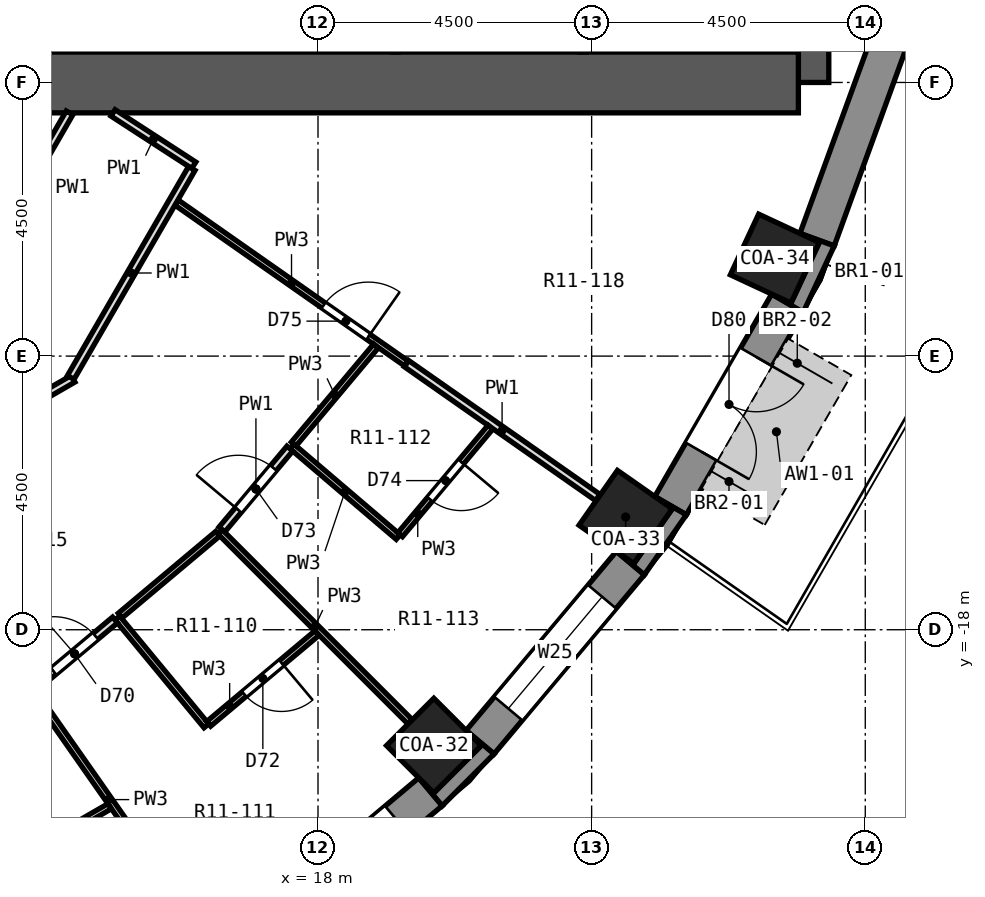
"""IFC4 building model, lengths in metres.
Left out: names, types, materials, properties, quantities, classifications, styles, units other than length and angle.
Written with IfcOpenShell. Run it as: python <this file> out.ifc"""

import sys

from ifc_helpers import new_model, si_unit, direction, frame, frame_2d, origin, origin_2d, place, context, subcontext, project, spatial, polyline, rectangle, outline, extrude, element, fill, save


model = new_model("IFC4")
c1 = context("Model", 3, precision=1e-05, world=origin(), true_north=direction((0.0, 1.0)))
c2 = subcontext(c1, "Body", "Model", "MODEL_VIEW")
j1 = project(units=[si_unit("LENGTHUNIT", "METRE"), si_unit("PLANEANGLEUNIT", "RADIAN")], contexts=[c1])
p1 = place(None, origin())
s1 = spatial("IfcSite", under=j1, at=p1, CompositionType="ELEMENT")
p2 = place(p1, origin())
s2 = spatial("IfcBuilding", under=s1, at=p2, CompositionType="ELEMENT")
p3 = place(p2, frame((0.0, 0.0, 46.1)))
s3 = spatial("IfcBuildingStorey", under=s2, at=p3, CompositionType="ELEMENT", Elevation=46.1)
for number, where, z_axis, x_axis in (
    (1, (19.905, -19.905, 0.0), (0.0, 0.0, 1.0), (0.707, -0.707, 0.0)),
    (2, (23.059, -16.146, 0.0), (0.0, 0.0, 1.0), (0.819, -0.574, 0.0)),
    (3, (25.512, -11.897, 0.0), (0.0, 0.0, 1.0), (0.906, -0.423, 0.0)),
):
    element("IfcColumn", number, at=place(p3, frame(where, z_axis=z_axis, x_axis=x_axis)), inside=s3, PredefinedType="COLUMN", context=c2, shape_type="SweptSolid", body=[
        extrude(rectangle(XDim=1.1, YDim=1.1, at=origin_2d()), origin(), (0.0, 0.0, 1.0), 3.3),
    ])
p4 = place(p3, frame((13.5, -9.0, 0.0), z_axis=(0.0, 0.0, 1.0), x_axis=(0.0, 1.0, 0.0)))
e4 = element("IfcWall", 4, at=p4, inside=s3, PredefinedType="SHEAR", context=c2, shape_type="SweptSolid", body=[
    extrude(rectangle(XDim=18.0, YDim=1.0, at=frame_2d((9.0, 0.0))), origin(), (0.0, 0.0, 1.0), 3.3),
])
p5 = place(p4, frame((15.4, 0.0, 0.0)))
e5 = element("IfcOpeningElement", 5, at=p5, cuts=e4, PredefinedType="OPENING", context=c2, shape_type="SweptSolid", body=[
    extrude(rectangle(XDim=1.2, YDim=2.1, at=frame_2d((0.6, 1.05))), frame((0.0, 0.512, 0.0), z_axis=(0.0, -1.0, 0.0), x_axis=(1.0, 0.0, 0.0)), (0.0, 0.0, 1.0), 1.024),
])
p6 = place(p4, frame((1.4, 0.0, 0.0)))
e6 = element("IfcOpeningElement", 6, at=p6, cuts=e4, PredefinedType="OPENING", context=c2, shape_type="SweptSolid", body=[
    extrude(rectangle(XDim=1.2, YDim=2.1, at=frame_2d((0.6, 1.05))), frame((0.0, 0.512, 0.0), z_axis=(0.0, -1.0, 0.0), x_axis=(1.0, 0.0, 0.0)), (0.0, 0.0, 1.0), 1.024),
])
p7 = place(p4, frame((7.5, 0.0, 0.0)))
e7 = element("IfcOpeningElement", 7, at=p7, cuts=e4, PredefinedType="OPENING", context=c2, shape_type="SweptSolid", body=[
    extrude(rectangle(XDim=3.0, YDim=2.4, at=frame_2d((1.5, 1.2))), frame((0.0, 0.512, 0.0), z_axis=(0.0, -1.0, 0.0), x_axis=(1.0, 0.0, 0.0)), (0.0, 0.0, 1.0), 1.024),
])
p8 = place(p3, frame((25.9, -9.0, 0.0), z_axis=(0.0, 0.0, 1.0), x_axis=(0.0, 1.0, 0.0)))
e8 = element("IfcWall", 8, at=p8, inside=s3, PredefinedType="SHEAR", context=c2, shape_type="SweptSolid", body=[
    extrude(rectangle(XDim=18.0, YDim=1.0, at=frame_2d((9.0, 0.0))), origin(), (0.0, 0.0, 1.0), 3.3),
])
p9 = place(p3, frame((13.5, -9.0, 0.0), z_axis=(0.0, 0.0, 1.0), x_axis=(1.0, 0.0, 0.0)))
e9 = element("IfcWall", 9, at=p9, inside=s3, PredefinedType="SHEAR", context=c2, shape_type="SweptSolid", body=[
    extrude(rectangle(XDim=12.4, YDim=1.0, at=frame_2d((6.2, 0.0))), origin(), (0.0, 0.0, 1.0), 3.3),
])
p10 = place(p3, frame((16.904, -23.137, 0.0), z_axis=(0.0, 0.0, 1.0), x_axis=(0.766026164483, 0.642809392687, 0.0)))
e10 = element("IfcWall", 10, at=p10, inside=s3, PredefinedType="SOLIDWALL", context=c2, shape_type="SweptSolid", body=[
    extrude(rectangle(XDim=3.846, YDim=0.6, at=frame_2d((1.923, 0.0))), origin(), (0.0, 0.0, 1.0), 2.75),
])
p11 = place(p10, frame((0.723, 0.0, 0.9)))
e11 = element("IfcOpeningElement", 11, at=p11, cuts=e10, PredefinedType="OPENING", context=c2, shape_type="SweptSolid", body=[
    extrude(rectangle(XDim=2.4, YDim=1.8, at=frame_2d((1.2, 0.9))), frame((0.0, 0.312, 0.0), z_axis=(0.0, -1.0, 0.0), x_axis=(1.0, 0.0, 0.0)), (0.0, 0.0, 1.0), 0.624),
])
p12 = place(p3, frame((20.665, -19.85, 0.0), z_axis=(0.0, 0.0, 1.0), x_axis=(0.642809392687, 0.766026164483, 0.0)))
e12 = element("IfcWall", 12, at=p12, inside=s3, PredefinedType="SOLIDWALL", context=c2, shape_type="SweptSolid", body=[
    extrude(rectangle(XDim=3.846, YDim=0.6, at=frame_2d((1.923, 0.0))), origin(), (0.0, 0.0, 1.0), 2.75),
])
p13 = place(p12, frame((0.723, 0.0, 0.9)))
e13 = element("IfcOpeningElement", 13, at=p13, cuts=e12, PredefinedType="OPENING", context=c2, shape_type="SweptSolid", body=[
    extrude(rectangle(XDim=2.4, YDim=1.8, at=frame_2d((1.2, 0.9))), frame((0.0, 0.312, 0.0), z_axis=(0.0, -1.0, 0.0), x_axis=(1.0, 0.0, 0.0)), (0.0, 0.0, 1.0), 0.624),
])
p14 = place(p3, frame((23.798, -15.96, 0.0), z_axis=(0.0, 0.0, 1.0), x_axis=(0.499989888488, 0.86603124159, 0.0)))
e14 = element("IfcWall", 14, at=p14, inside=s3, PredefinedType="SOLIDWALL", context=c2, shape_type="SweptSolid", body=[
    extrude(rectangle(XDim=3.846, YDim=0.6, at=frame_2d((1.923, 0.0))), origin(), (0.0, 0.0, 1.0), 2.75),
])
p15 = place(p14, frame((1.023, 0.0, 0.0)))
e15 = element("IfcOpeningElement", 15, at=p15, cuts=e14, PredefinedType="OPENING", context=c2, shape_type="SweptSolid", body=[
    extrude(rectangle(XDim=1.8, YDim=2.4, at=frame_2d((0.9, 1.2))), frame((0.0, 0.312, 0.0), z_axis=(0.0, -1.0, 0.0), x_axis=(1.0, 0.0, 0.0)), (0.0, 0.0, 1.0), 0.624),
])
p16 = place(p3, frame((26.208, -11.585, 0.0), z_axis=(0.0, 0.0, 1.0), x_axis=(0.342028474173, 0.939689588564, 0.0)))
e16 = element("IfcWall", 16, at=p16, inside=s3, PredefinedType="SOLIDWALL", context=c2, shape_type="SweptSolid", body=[
    extrude(rectangle(XDim=3.846, YDim=0.6, at=frame_2d((1.923, 0.0))), origin(), (0.0, 0.0, 1.0), 2.75),
])
p17 = place(p3, origin())
e17 = element("IfcWall", 17, at=p17, inside=s3, PredefinedType="SOLIDWALL", context=c2, shape_type="SweptSolid", body=[
    extrude(outline(polyline([(20.895, -20.043), (20.435, -19.657), (20.683, -19.905), (19.905, -20.683), (19.657, -20.435), (20.043, -20.895), (20.895, -20.043)])), origin(), (0.0, 0.0, 1.0), 2.75),
])
p18 = place(p3, origin())
e18 = element("IfcWall", 18, at=p18, inside=s3, PredefinedType="SOLIDWALL", context=c2, shape_type="SweptSolid", body=[
    extrude(outline(polyline([(23.367, -17.097), (24.058, -16.11), (23.538, -15.81), (23.825, -16.011), (23.194, -16.912), (22.907, -16.711), (23.367, -17.097)])), origin(), (0.0, 0.0, 1.0), 2.75),
])
p19 = place(p3, origin())
e19 = element("IfcWall", 19, at=p19, inside=s3, PredefinedType="SOLIDWALL", context=c2, shape_type="SweptSolid", body=[
    extrude(outline(polyline([(26.49, -11.688), (25.926, -11.483), (26.243, -11.631), (25.779, -12.628), (25.461, -12.479), (25.981, -12.78), (26.49, -11.688)])), origin(), (0.0, 0.0, 1.0), 2.75),
])
p20 = place(p3, frame((13.294, -18.986, 0.0), z_axis=(0.0, 0.0, 1.0), x_axis=(0.573391786342, -0.819281306607, 0.0)))
e20 = element("IfcWall", 20, at=p20, inside=s3, PredefinedType="PARTITIONING", context=c2, shape_type="SweptSolid", body=[
    extrude(rectangle(XDim=4.412, YDim=0.1, at=frame_2d((2.206, 0.0))), origin(), (0.0, 0.0, 1.0), 2.75),
])
p21 = place(p3, frame((14.7, -17.807, 0.0), z_axis=(0.0, 0.0, 1.0), x_axis=(0.636700344293, -0.771111322428, 0.0)))
e21 = element("IfcWall", 21, at=p21, inside=s3, PredefinedType="PARTITIONING", context=c2, shape_type="SweptSolid", body=[
    extrude(rectangle(XDim=2.3, YDim=0.1, at=frame_2d((1.15, 0.0))), origin(), (0.0, 0.0, 1.0), 2.75),
])
p22 = place(p3, frame((16.389, -16.389, 0.0), z_axis=(0.0, 0.0, 1.0), x_axis=(0.707106781187, -0.707106781187, 0.0)))
e22 = element("IfcWall", 22, at=p22, inside=s3, PredefinedType="PARTITIONING", context=c2, shape_type="SweptSolid", body=[
    extrude(rectangle(XDim=4.413, YDim=0.1, at=frame_2d((2.206, 0.0))), origin(), (0.0, 0.0, 1.0), 2.75),
])
p23 = place(p3, frame((17.569, -14.983, 0.0), z_axis=(0.0, 0.0, 1.0), x_axis=(0.760722977127, -0.649076691979, 0.0)))
e23 = element("IfcWall", 23, at=p23, inside=s3, PredefinedType="PARTITIONING", context=c2, shape_type="SweptSolid", body=[
    extrude(rectangle(XDim=2.301, YDim=0.1, at=frame_2d((1.15, 0.0))), origin(), (0.0, 0.0, 1.0), 2.75),
])
p24 = place(p3, frame((19.454, -13.623, 0.0), z_axis=(0.0, 0.0, 1.0), x_axis=(0.819318529686, -0.573338597091, 0.0)))
e24 = element("IfcWall", 24, at=p24, inside=s3, PredefinedType="PARTITIONING", context=c2, shape_type="SweptSolid", body=[
    extrude(rectangle(XDim=3.84, YDim=0.125, at=frame_2d((1.92, 0.0))), origin(), (0.0, 0.0, 1.0), 2.75),
])
p25 = place(p3, frame((15.675, -10.976, 0.0), z_axis=(0.0, 0.0, 1.0), x_axis=(0.819202093006, -0.573504952737, 0.0)))
e25 = element("IfcWall", 25, at=p25, inside=s3, PredefinedType="PARTITIONING", context=c2, shape_type="SweptSolid", body=[
    extrude(rectangle(XDim=4.615, YDim=0.1, at=frame_2d((2.307, 0.0))), origin(), (0.0, 0.0, 1.0), 2.75),
])
p26 = place(p25, frame((2.949, 0.0, 0.0)))
e26 = element("IfcOpeningElement", 26, at=p26, cuts=e25, PredefinedType="OPENING", context=c2, shape_type="SweptSolid", body=[
    extrude(rectangle(XDim=0.9, YDim=2.1, at=frame_2d((0.45, 1.05))), frame((0.0, 0.062, 0.0), z_axis=(0.0, -1.0, 0.0), x_axis=(1.0, 0.0, 0.0)), (0.0, 0.0, 1.0), 0.124),
])
p27 = place(p3, frame((14.629, -9.5, 0.0), z_axis=(0.0, 0.0, 1.0), x_axis=(0.838795721465, -0.544446267002, 0.0)))
e27 = element("IfcWall", 27, at=p27, inside=s3, PredefinedType="PARTITIONING", context=c2, shape_type="SweptSolid", body=[
    extrude(rectangle(XDim=1.583, YDim=0.125, at=frame_2d((0.792, 0.0))), origin(), (0.0, 0.0, 1.0), 2.75),
])
p28 = place(p3, frame((12.562, -22.065, 0.0), z_axis=(0.0, 0.0, 1.0), x_axis=(0.865919666768, 0.50018309718, 0.0)))
e28 = element("IfcWall", 28, at=p28, inside=s3, PredefinedType="PARTITIONING", context=c2, shape_type="SweptSolid", body=[
    extrude(rectangle(XDim=2.324, YDim=0.1, at=frame_2d((1.162, 0.0))), origin(), (0.0, 0.0, 1.0), 2.75),
])
p29 = place(p28, frame((0.762, 0.0, 0.0)))
e29 = element("IfcOpeningElement", 29, at=p29, cuts=e28, PredefinedType="OPENING", context=c2, shape_type="SweptSolid", body=[
    extrude(rectangle(XDim=0.8, YDim=2.1, at=frame_2d((0.4, 1.05))), frame((0.0, 0.062, 0.0), z_axis=(0.0, -1.0, 0.0), x_axis=(1.0, 0.0, 0.0)), (0.0, 0.0, 1.0), 0.124),
])
p30 = place(p3, frame((5.145, -18.969, 0.0), z_axis=(0.0, 0.0, 1.0), x_axis=(0.866035198373, 0.499983034892, 0.0)))
e30 = element("IfcWall", 30, at=p30, inside=s3, PredefinedType="PARTITIONING", context=c2, shape_type="SweptSolid", body=[
    extrude(rectangle(XDim=10.192, YDim=0.125, at=frame_2d((5.096, 0.0))), origin(), (0.0, 0.0, 1.0), 2.75),
])
p31 = place(p30, frame((7.577, 0.0, 0.0)))
e31 = element("IfcOpeningElement", 31, at=p31, cuts=e30, PredefinedType="OPENING", context=c2, shape_type="SweptSolid", body=[
    extrude(rectangle(XDim=1.0, YDim=2.1, at=frame_2d((0.5, 1.05))), frame((0.0, 0.074, 0.0), z_axis=(0.0, -1.0, 0.0), x_axis=(1.0, 0.0, 0.0)), (0.0, 0.0, 1.0), 0.149),
])
p32 = place(p3, frame((13.332, -18.953, 0.0), z_axis=(0.0, 0.0, 1.0), x_axis=(0.766881682313, 0.641788505143, 0.0)))
e32 = element("IfcWall", 32, at=p32, inside=s3, PredefinedType="PARTITIONING", context=c2, shape_type="SweptSolid", body=[
    extrude(rectangle(XDim=1.735, YDim=0.125, at=frame_2d((0.868, 0.0))), origin(), (0.0, 0.0, 1.0), 2.75),
])
p33 = place(p32, frame((0.417, 0.0, 0.0)))
e33 = element("IfcOpeningElement", 33, at=p33, cuts=e32, PredefinedType="OPENING", context=c2, shape_type="SweptSolid", body=[
    extrude(rectangle(XDim=0.9, YDim=2.1, at=frame_2d((0.45, 1.05))), frame((0.0, 0.074, 0.0), z_axis=(0.0, -1.0, 0.0), x_axis=(1.0, 0.0, 0.0)), (0.0, 0.0, 1.0), 0.149),
])
p34 = place(p3, frame((16.202, -19.548, 0.0), z_axis=(0.0, 0.0, 1.0), x_axis=(0.766254925891, 0.642536682648, 0.0)))
e34 = element("IfcWall", 34, at=p34, inside=s3, PredefinedType="PARTITIONING", context=c2, shape_type="SweptSolid", body=[
    extrude(rectangle(XDim=2.325, YDim=0.1, at=frame_2d((1.162, 0.0))), origin(), (0.0, 0.0, 1.0), 2.75),
])
p35 = place(p34, frame((0.762, 0.0, 0.0)))
e35 = element("IfcOpeningElement", 35, at=p35, cuts=e34, PredefinedType="OPENING", context=c2, shape_type="SweptSolid", body=[
    extrude(rectangle(XDim=0.8, YDim=2.1, at=frame_2d((0.4, 1.05))), frame((0.0, 0.062, 0.0), z_axis=(0.0, -1.0, 0.0), x_axis=(1.0, 0.0, 0.0)), (0.0, 0.0, 1.0), 0.124),
])
p36 = place(p3, frame((14.748, -17.767, 0.0), z_axis=(0.0, 0.0, 1.0), x_axis=(0.765854222204, 0.643014238048, 0.0)))
e36 = element("IfcWall", 36, at=p36, inside=s3, PredefinedType="PARTITIONING", context=c2, shape_type="SweptSolid", body=[
    extrude(rectangle(XDim=2.093, YDim=0.1, at=frame_2d((1.046, 0.0))), origin(), (0.0, 0.0, 1.0), 2.75),
])
p37 = place(p3, frame((19.351, -16.438, 0.0), z_axis=(0.0, 0.0, 1.0), x_axis=(0.642780417595, 0.766050477943, 0.0)))
e37 = element("IfcWall", 37, at=p37, inside=s3, PredefinedType="PARTITIONING", context=c2, shape_type="SweptSolid", body=[
    extrude(rectangle(XDim=2.309, YDim=0.1, at=frame_2d((1.155, 0.0))), origin(), (0.0, 0.0, 1.0), 2.75),
])
p38 = place(p37, frame((0.762, 0.0, 0.0)))
e38 = element("IfcOpeningElement", 38, at=p38, cuts=e37, PredefinedType="OPENING", context=c2, shape_type="SweptSolid", body=[
    extrude(rectangle(XDim=0.8, YDim=2.1, at=frame_2d((0.4, 1.05))), frame((0.0, 0.062, 0.0), z_axis=(0.0, -1.0, 0.0), x_axis=(1.0, 0.0, 0.0)), (0.0, 0.0, 1.0), 0.124),
])
p39 = place(p3, frame((17.601, -14.945, 0.0), z_axis=(0.0, 0.0, 1.0), x_axis=(0.642816551594, 0.766020157043, 0.0)))
e39 = element("IfcWall", 39, at=p39, inside=s3, PredefinedType="PARTITIONING", context=c2, shape_type="SweptSolid", body=[
    extrude(rectangle(XDim=2.104, YDim=0.1, at=frame_2d((1.052, 0.0))), origin(), (0.0, 0.0, 1.0), 2.75),
])
p40 = place(p3, frame((16.421, -16.351, 0.0), z_axis=(0.0, 0.0, 1.0), x_axis=(0.642878617967, 0.765968068891, 0.0)))
e40 = element("IfcWall", 40, at=p40, inside=s3, PredefinedType="PARTITIONING", context=c2, shape_type="SweptSolid", body=[
    extrude(rectangle(XDim=1.736, YDim=0.125, at=frame_2d((0.868, 0.0))), origin(), (0.0, 0.0, 1.0), 2.75),
])
p41 = place(p40, frame((0.418, 0.0, 0.0)))
e41 = element("IfcOpeningElement", 41, at=p41, cuts=e40, PredefinedType="OPENING", context=c2, shape_type="SweptSolid", body=[
    extrude(rectangle(XDim=0.9, YDim=2.1, at=frame_2d((0.45, 1.05))), frame((0.0, 0.074, 0.0), z_axis=(0.0, -1.0, 0.0), x_axis=(1.0, 0.0, 0.0)), (0.0, 0.0, 1.0), 0.149),
])
p42 = place(p3, frame((13.934, -13.851, 0.0), z_axis=(0.0, 0.0, 1.0), x_axis=(0.501169568558, 0.865349099238, 0.0)))
e42 = element("IfcWall", 42, at=p42, inside=s3, PredefinedType="PARTITIONING", context=c2, shape_type="SweptSolid", body=[
    extrude(rectangle(XDim=3.971, YDim=0.125, at=frame_2d((1.985, 0.0))), origin(), (0.0, 0.0, 1.0), 2.75),
])
p43 = place(p3, frame((13.045, -11.005, 0.0), z_axis=(0.0, 0.0, 1.0), x_axis=(0.500066958712, 0.865986741702, 0.0)))
e43 = element("IfcWall", 43, at=p43, inside=s3, PredefinedType="PARTITIONING", context=c2, shape_type="SweptSolid", body=[
    extrude(rectangle(XDim=1.738, YDim=0.125, at=frame_2d((0.869, 0.0))), origin(), (0.0, 0.0, 1.0), 2.75),
])
p44 = place(p3, frame((19.27, -8.5, 0.0), z_axis=(0.0, 0.0, 1.0), x_axis=(0.0, 1.0, 0.0)))
e44 = element("IfcWall", 44, at=p44, inside=s3, PredefinedType="PARTITIONING", context=c2, shape_type="SweptSolid", body=[
    extrude(rectangle(XDim=3.2, YDim=0.1, at=frame_2d((1.6, 0.0))), origin(), (0.0, 0.0, 1.0), 2.75),
])
p45 = place(p3, frame((22.36, -8.5, 0.0), z_axis=(0.0, 0.0, 1.0), x_axis=(0.0, 1.0, 0.0)))
e45 = element("IfcWall", 45, at=p45, inside=s3, PredefinedType="PARTITIONING", context=c2, shape_type="SweptSolid", body=[
    extrude(rectangle(XDim=3.2, YDim=0.1, at=frame_2d((1.6, 0.0))), origin(), (0.0, 0.0, 1.0), 2.75),
])
p46 = place(p45, frame((1.15, 0.0, 0.0)))
e46 = element("IfcOpeningElement", 46, at=p46, cuts=e45, PredefinedType="OPENING", context=c2, shape_type="SweptSolid", body=[
    extrude(rectangle(XDim=0.9, YDim=2.1, at=frame_2d((0.45, 1.05))), frame((0.0, 0.062, 0.0), z_axis=(0.0, -1.0, 0.0), x_axis=(1.0, 0.0, 0.0)), (0.0, 0.0, 1.0), 0.124),
])
p47 = place(p11, origin())
e47 = element("IfcWindow", 47, at=p47, inside=s3, PartitioningType="SINGLE_PANEL", PredefinedType="WINDOW", context=c2, shape_type="SweptSolid", body=[
    extrude(rectangle(XDim=2.4, YDim=1.8, at=frame_2d((1.2, 0.9))), frame((0.0, 0.18, 0.0), z_axis=(0.0, -1.0, 0.0), x_axis=(1.0, 0.0, 0.0)), (0.0, 0.0, 1.0), 0.06),
])
fill(e11, e47)
p48 = place(p13, origin())
e48 = element("IfcWindow", 48, at=p48, inside=s3, PartitioningType="SINGLE_PANEL", PredefinedType="WINDOW", context=c2, shape_type="SweptSolid", body=[
    extrude(rectangle(XDim=2.4, YDim=1.8, at=frame_2d((1.2, 0.9))), frame((0.0, 0.18, 0.0), z_axis=(0.0, -1.0, 0.0), x_axis=(1.0, 0.0, 0.0)), (0.0, 0.0, 1.0), 0.06),
])
fill(e13, e48)
p49 = place(p15, frame((1.8, 0.0, 0.0), z_axis=(0.0, 0.0, 1.0), x_axis=(-1.0, 0.0, 0.0)))
e49 = element("IfcDoor", 49, at=p49, inside=s3, OperationType="DOUBLE_DOOR_SINGLE_SWING", PredefinedType="DOOR", context=c2, shape_type="SweptSolid", body=[
    extrude(rectangle(XDim=1.8, YDim=2.4, at=frame_2d((0.9, 1.2))), frame((0.0, -0.075, 0.0), z_axis=(0.0, -1.0, 0.0), x_axis=(1.0, 0.0, 0.0)), (0.0, 0.0, 1.0), 0.05),
])
fill(e15, e49)
p50 = place(p33, origin())
e50 = element("IfcDoor", 50, at=p50, inside=s3, OperationType="SINGLE_SWING_LEFT", PredefinedType="DOOR", context=c2, shape_type="SweptSolid", body=[
    extrude(rectangle(XDim=0.9, YDim=2.1, at=frame_2d((0.45, 1.05))), frame((0.0, 0.025, 0.0), z_axis=(0.0, -1.0, 0.0), x_axis=(1.0, 0.0, 0.0)), (0.0, 0.0, 1.0), 0.05),
])
fill(e33, e50)
p51 = place(p35, frame((0.8, 0.0, 0.0), z_axis=(0.0, 0.0, 1.0), x_axis=(-1.0, 0.0, 0.0)))
e51 = element("IfcDoor", 51, at=p51, inside=s3, OperationType="SINGLE_SWING_LEFT", PredefinedType="DOOR", context=c2, shape_type="SweptSolid", body=[
    extrude(rectangle(XDim=0.8, YDim=2.1, at=frame_2d((0.4, 1.05))), frame((0.0, 0.025, 0.0), z_axis=(0.0, -1.0, 0.0), x_axis=(1.0, 0.0, 0.0)), (0.0, 0.0, 1.0), 0.05),
])
fill(e35, e51)
p52 = place(p41, origin())
e52 = element("IfcDoor", 52, at=p52, inside=s3, OperationType="SINGLE_SWING_LEFT", PredefinedType="DOOR", context=c2, shape_type="SweptSolid", body=[
    extrude(rectangle(XDim=0.9, YDim=2.1, at=frame_2d((0.45, 1.05))), frame((0.0, 0.025, 0.0), z_axis=(0.0, -1.0, 0.0), x_axis=(1.0, 0.0, 0.0)), (0.0, 0.0, 1.0), 0.05),
])
fill(e41, e52)
p53 = place(p38, frame((0.8, 0.0, 0.0), z_axis=(0.0, 0.0, 1.0), x_axis=(-1.0, 0.0, 0.0)))
e53 = element("IfcDoor", 53, at=p53, inside=s3, OperationType="SINGLE_SWING_LEFT", PredefinedType="DOOR", context=c2, shape_type="SweptSolid", body=[
    extrude(rectangle(XDim=0.8, YDim=2.1, at=frame_2d((0.4, 1.05))), frame((0.0, 0.025, 0.0), z_axis=(0.0, -1.0, 0.0), x_axis=(1.0, 0.0, 0.0)), (0.0, 0.0, 1.0), 0.05),
])
fill(e38, e53)
p54 = place(p26, origin())
e54 = element("IfcDoor", 54, at=p54, inside=s3, OperationType="SINGLE_SWING_RIGHT", PredefinedType="DOOR", context=c2, shape_type="SweptSolid", body=[
    extrude(rectangle(XDim=0.9, YDim=2.1, at=frame_2d((0.45, 1.05))), frame((0.0, 0.025, 0.0), z_axis=(0.0, -1.0, 0.0), x_axis=(1.0, 0.0, 0.0)), (0.0, 0.0, 1.0), 0.05),
])
fill(e26, e54)
save(model, sys.argv[1])
